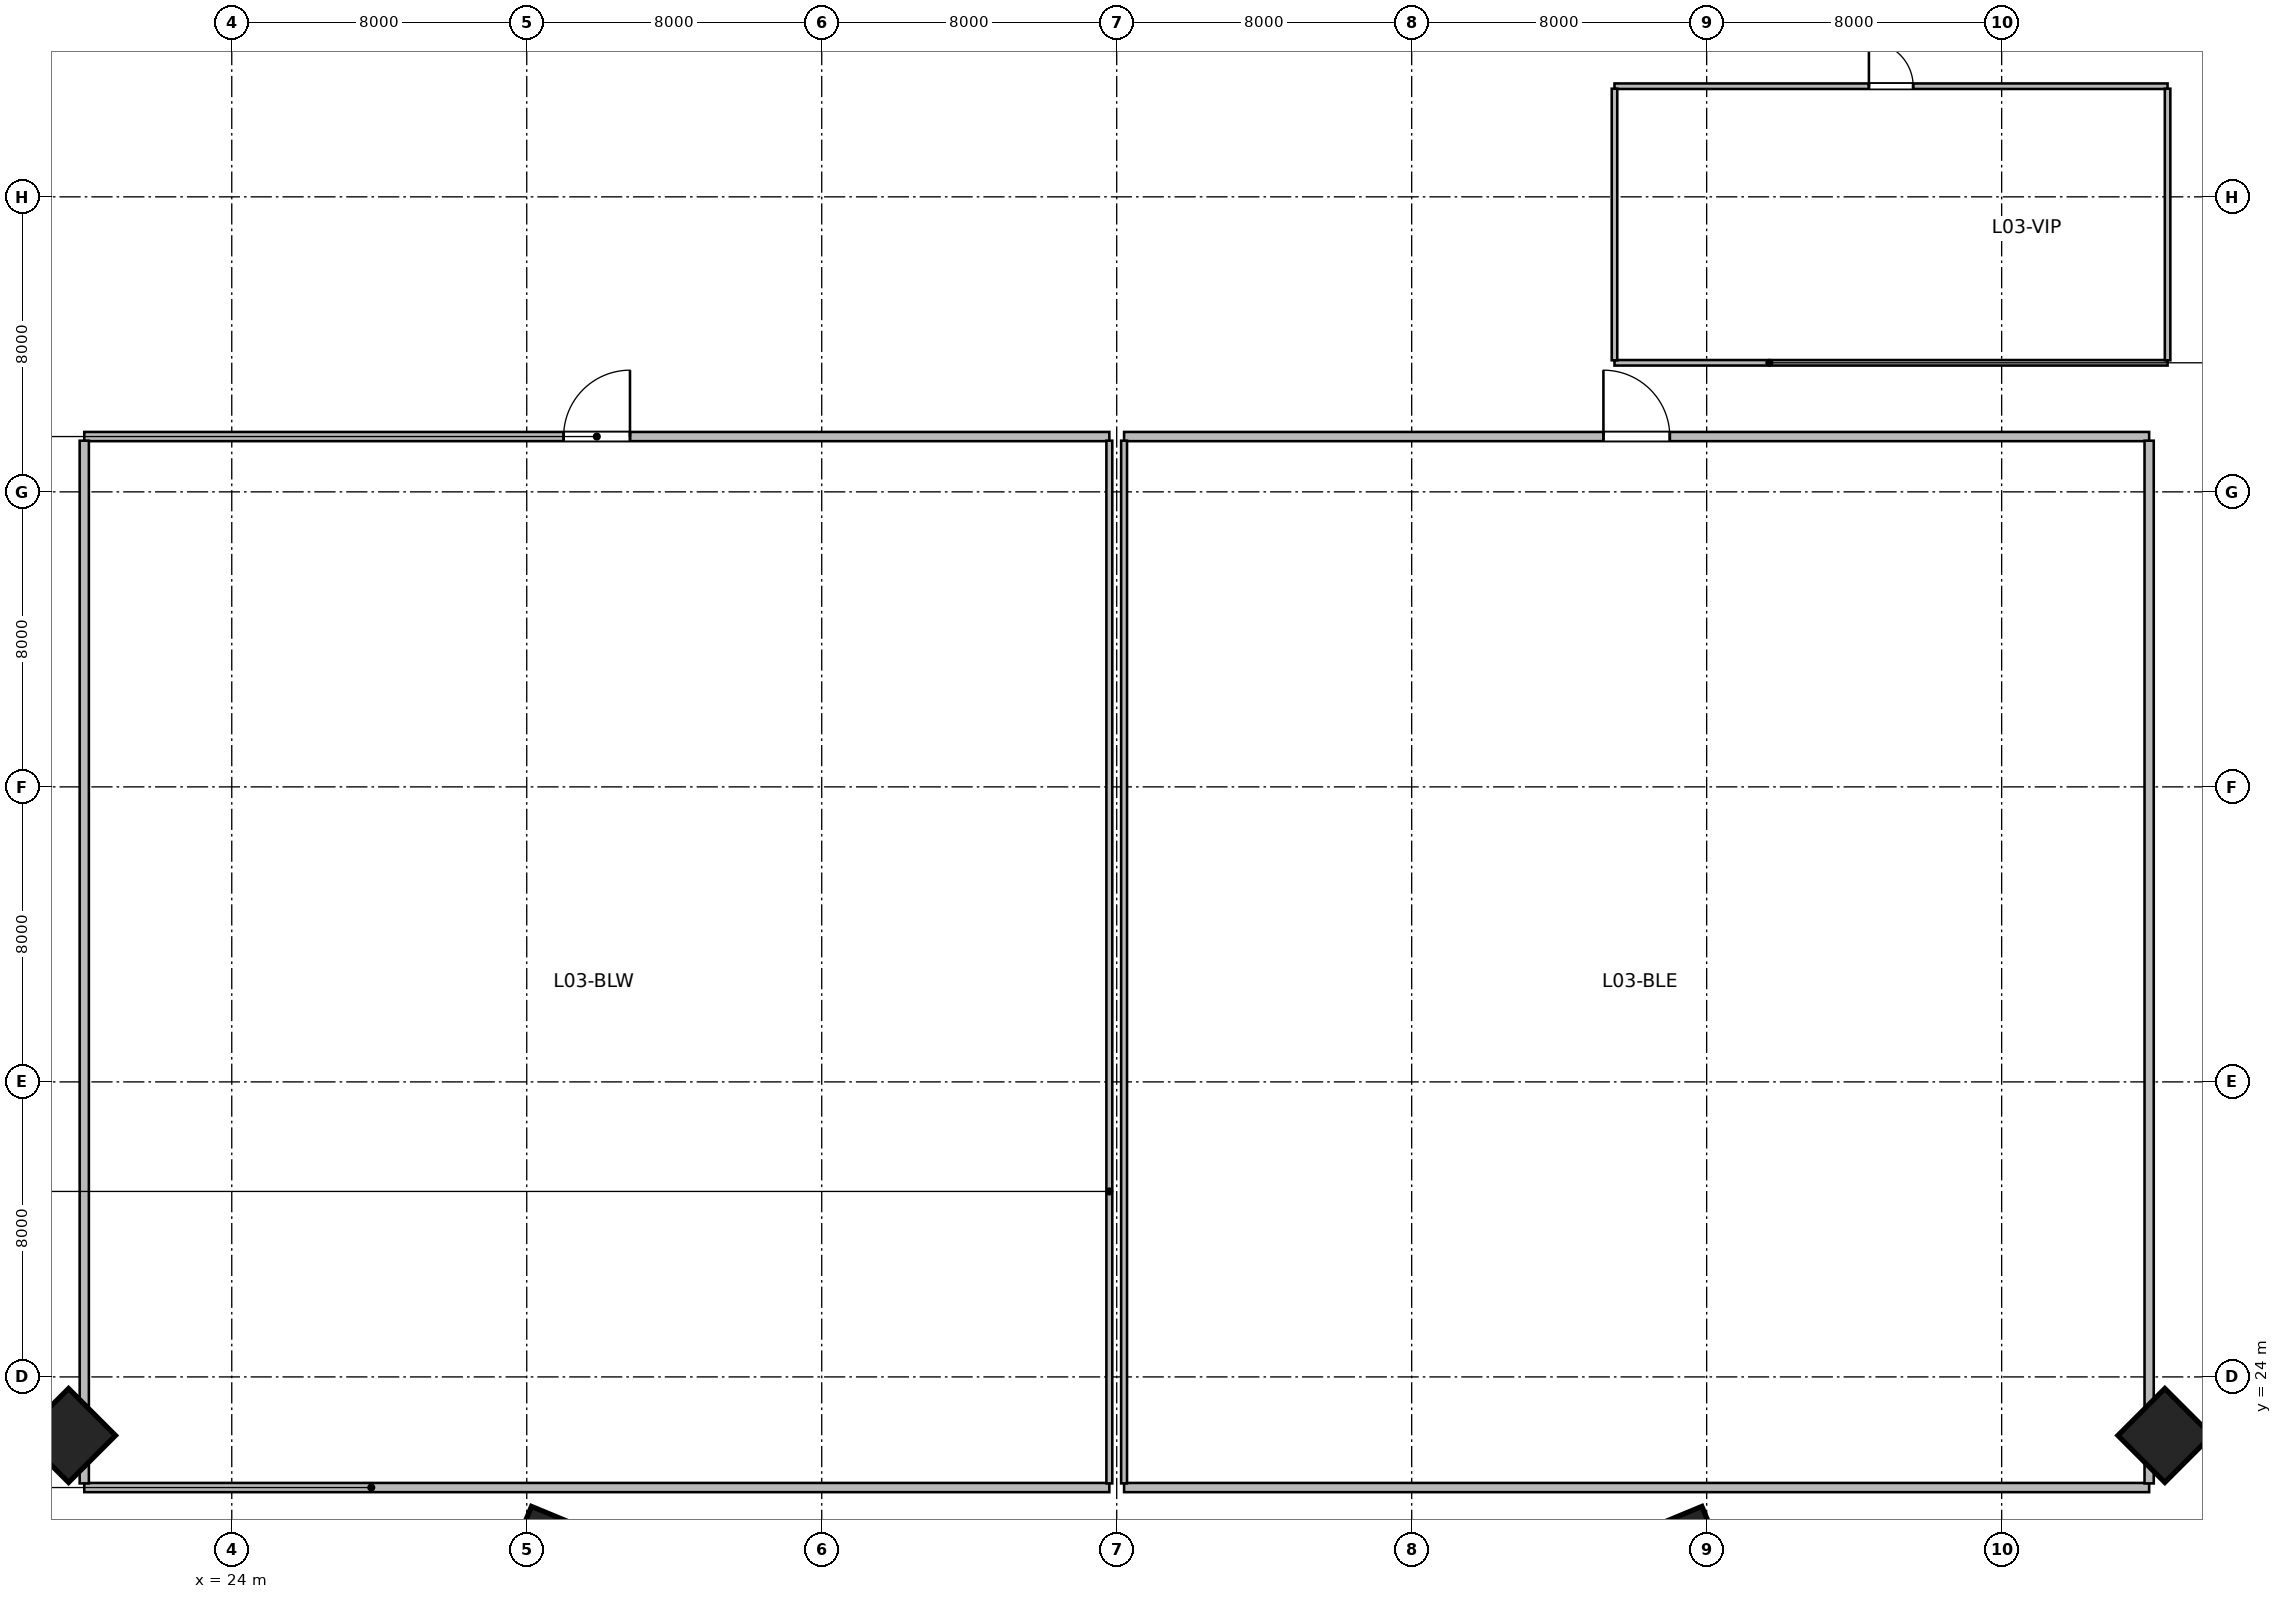
"""IFC4 building model, lengths in metres.
Left out: names, types, materials, properties, quantities, classifications, styles, units other than length and angle.
Written with IfcOpenShell. Run it as: python <this file> out.ifc"""

import sys

from ifc_helpers import new_model, si_unit, direction, frame, frame_2d, origin, origin_2d, place, context, subcontext, project, spatial, rectangle, extrude, source, transform, mapped, element, fill, save


model = new_model("IFC4")
c1 = context("Model", 3, precision=1e-05, world=origin(), true_north=direction((0.0, 1.0)))
c2 = subcontext(c1, "Body", "Model", "MODEL_VIEW")
j1 = project(units=[si_unit("LENGTHUNIT", "METRE"), si_unit("PLANEANGLEUNIT", "RADIAN")], contexts=[c1])
p1 = place(None, origin())
s1 = spatial("IfcSite", under=j1, at=p1, CompositionType="ELEMENT")
p2 = place(p1, origin())
s2 = spatial("IfcBuilding", under=s1, at=p2, CompositionType="ELEMENT")
p3 = place(p2, frame((0.0, 0.0, 18.0)))
s3 = spatial("IfcBuildingStorey", under=s2, at=p3, CompositionType="ELEMENT", Elevation=18.0)
m1 = source(origin(), c2, "Body", "SweptSolid", [
    extrude(rectangle(XDim=1.8, YDim=1.8, at=origin_2d()), origin(), (0.0, 0.0, 1.0), 6.0),
])
for number, where, z_axis, x_axis in (
    (1, (19.574, 22.412, 0.0), (0.0, 0.0, 1.0), (-0.707, -0.707, 0.0)),
    (2, (32.616, 19.312, 0.0), (0.0, 0.0, 1.0), (-0.383, -0.924, 0.0)),
    (3, (63.384, 19.312, 0.0), (0.0, 0.0, 1.0), (0.383, -0.924, 0.0)),
    (4, (76.426, 22.412, 0.0), (0.0, 0.0, 1.0), (0.707, -0.707, 0.0)),
):
    element("IfcColumn", number, at=place(p3, frame(where, z_axis=z_axis, x_axis=x_axis)), inside=s3, PredefinedType="COLUMN", context=c2, shape_type="MappedRepresentation", body=[
        mapped(m1, transform((0.0, 0.0, 0.0), scale=1.0)),
    ])
m2 = source(origin(), c2, "Body", "SweptSolid", [
    extrude(rectangle(XDim=27.8, YDim=0.25, at=frame_2d((13.9, 0.0))), origin(), (0.0, 0.0, 1.0), 4.681),
])
p4 = place(p3, frame((20.0, 21.0, 0.0), z_axis=(0.0, 0.0, 1.0), x_axis=(1.0, 0.0, 0.0)))
e5 = element("IfcWall", 5, at=p4, inside=s3, PredefinedType="PARTITIONING", context=c2, shape_type="MappedRepresentation", body=[
    mapped(m2, transform((0.0, 0.0, 0.0), scale=1.0)),
])
m3 = source(origin(), c2, "Body", "SweptSolid", [
    extrude(rectangle(XDim=27.8, YDim=0.25, at=frame_2d((13.9, 0.0))), origin(), (0.0, 0.0, 1.0), 5.62),
])
p5 = place(p3, frame((20.0, 49.5, 0.0), z_axis=(0.0, 0.0, 1.0), x_axis=(1.0, 0.0, 0.0)))
e6 = element("IfcWall", 6, at=p5, inside=s3, PredefinedType="PARTITIONING", context=c2, shape_type="MappedRepresentation", body=[
    mapped(m3, transform((0.0, 0.0, 0.0), scale=1.0)),
])
p6 = place(p5, frame((13.0, 0.0, 0.0)))
e7 = element("IfcOpeningElement", 7, at=p6, cuts=e6, PredefinedType="OPENING", context=c2, shape_type="SweptSolid", body=[
    extrude(rectangle(XDim=1.8, YDim=2.15, at=frame_2d((0.9, 1.075))), frame((0.0, 0.135, 0.0), z_axis=(0.0, -1.0, 0.0), x_axis=(1.0, 0.0, 0.0)), (0.0, 0.0, 1.0), 0.27),
])
m4 = source(origin(), c2, "Body", "SweptSolid", [
    extrude(rectangle(XDim=28.275, YDim=0.25, at=frame_2d((14.137, 0.0))), origin(), (0.0, 0.0, 1.0), 4.754),
])
p7 = place(p3, frame((20.0, 21.113, 0.0), z_axis=(0.0, 0.0, 1.0), x_axis=(0.0, 1.0, 0.0)))
e8 = element("IfcWall", 8, at=p7, inside=s3, PredefinedType="PARTITIONING", context=c2, shape_type="MappedRepresentation", body=[
    mapped(m4, transform((0.0, 0.0, 0.0), scale=1.0)),
])
m5 = source(origin(), c2, "Body", "SweptSolid", [
    extrude(rectangle(XDim=28.275, YDim=0.16, at=frame_2d((14.137, 0.0))), origin(), (0.0, 0.0, 1.0), 5.137),
])
p8 = place(p3, frame((47.8, 21.113, 0.0), z_axis=(0.0, 0.0, 1.0), x_axis=(0.0, 1.0, 0.0)))
e9 = element("IfcWall", 9, at=p8, inside=s3, PredefinedType="MOVABLE", context=c2, shape_type="MappedRepresentation", body=[
    mapped(m5, transform((0.0, 0.0, 0.0), scale=1.0)),
])
p9 = place(p3, frame((48.2, 21.0, 0.0), z_axis=(0.0, 0.0, 1.0), x_axis=(1.0, 0.0, 0.0)))
e10 = element("IfcWall", 10, at=p9, inside=s3, PredefinedType="PARTITIONING", context=c2, shape_type="MappedRepresentation", body=[
    mapped(m2, transform((0.0, 0.0, 0.0), scale=1.0)),
])
p10 = place(p3, frame((48.2, 49.5, 0.0), z_axis=(0.0, 0.0, 1.0), x_axis=(1.0, 0.0, 0.0)))
e11 = element("IfcWall", 11, at=p10, inside=s3, PredefinedType="PARTITIONING", context=c2, shape_type="MappedRepresentation", body=[
    mapped(m3, transform((0.0, 0.0, 0.0), scale=1.0)),
])
p11 = place(p10, frame((13.0, 0.0, 0.0)))
e12 = element("IfcOpeningElement", 12, at=p11, cuts=e11, PredefinedType="OPENING", context=c2, shape_type="SweptSolid", body=[
    extrude(rectangle(XDim=1.8, YDim=2.15, at=frame_2d((0.9, 1.075))), frame((0.0, 0.135, 0.0), z_axis=(0.0, -1.0, 0.0), x_axis=(1.0, 0.0, 0.0)), (0.0, 0.0, 1.0), 0.27),
])
p12 = place(p3, frame((48.2, 21.113, 0.0), z_axis=(0.0, 0.0, 1.0), x_axis=(0.0, 1.0, 0.0)))
e13 = element("IfcWall", 13, at=p12, inside=s3, PredefinedType="MOVABLE", context=c2, shape_type="MappedRepresentation", body=[
    mapped(m5, transform((0.0, 0.0, 0.0), scale=1.0)),
])
p13 = place(p3, frame((76.0, 21.113, 0.0), z_axis=(0.0, 0.0, 1.0), x_axis=(0.0, 1.0, 0.0)))
e14 = element("IfcWall", 14, at=p13, inside=s3, PredefinedType="PARTITIONING", context=c2, shape_type="MappedRepresentation", body=[
    mapped(m4, transform((0.0, 0.0, 0.0), scale=1.0)),
])
m6 = source(origin(), c2, "Body", "SweptSolid", [
    extrude(rectangle(XDim=15.0, YDim=0.15, at=frame_2d((7.5, 0.0))), origin(), (0.0, 0.0, 1.0), 5.62),
])
p14 = place(p3, frame((61.5, 51.5, 0.0), z_axis=(0.0, 0.0, 1.0), x_axis=(1.0, 0.0, 0.0)))
e15 = element("IfcWall", 15, at=p14, inside=s3, PredefinedType="PARTITIONING", context=c2, shape_type="MappedRepresentation", body=[
    mapped(m6, transform((0.0, 0.0, 0.0), scale=1.0)),
])
m7 = source(origin(), c2, "Body", "SweptSolid", [
    extrude(rectangle(XDim=15.0, YDim=0.15, at=frame_2d((7.5, 0.0))), origin(), (0.0, 0.0, 1.0), 4.754),
])
p15 = place(p3, frame((61.5, 59.0, 0.0), z_axis=(0.0, 0.0, 1.0), x_axis=(1.0, 0.0, 0.0)))
e16 = element("IfcWall", 16, at=p15, inside=s3, PredefinedType="PARTITIONING", context=c2, shape_type="MappedRepresentation", body=[
    mapped(m7, transform((0.0, 0.0, 0.0), scale=1.0)),
])
p16 = place(p15, frame((6.9, 0.0, 0.0)))
e17 = element("IfcOpeningElement", 17, at=p16, cuts=e16, PredefinedType="OPENING", context=c2, shape_type="SweptSolid", body=[
    extrude(rectangle(XDim=1.2, YDim=2.15, at=frame_2d((0.6, 1.075))), frame((0.0, 0.085, 0.0), z_axis=(0.0, -1.0, 0.0), x_axis=(1.0, 0.0, 0.0)), (0.0, 0.0, 1.0), 0.17),
])
m8 = source(origin(), c2, "Body", "SweptSolid", [
    extrude(rectangle(XDim=7.365, YDim=0.15, at=frame_2d((3.683, 0.0))), origin(), (0.0, 0.0, 1.0), 4.754),
])
p17 = place(p3, frame((61.5, 51.567, 0.0), z_axis=(0.0, 0.0, 1.0), x_axis=(0.0, 1.0, 0.0)))
e18 = element("IfcWall", 18, at=p17, inside=s3, PredefinedType="PARTITIONING", context=c2, shape_type="MappedRepresentation", body=[
    mapped(m8, transform((0.0, 0.0, 0.0), scale=1.0)),
])
m9 = source(origin(), c2, "Body", "SweptSolid", [
    extrude(rectangle(XDim=7.365, YDim=0.15, at=frame_2d((3.683, 0.0))), origin(), (0.0, 0.0, 1.0), 5.62),
])
p18 = place(p3, frame((76.5, 51.567, 0.0), z_axis=(0.0, 0.0, 1.0), x_axis=(0.0, 1.0, 0.0)))
e19 = element("IfcWall", 19, at=p18, inside=s3, PredefinedType="PARTITIONING", context=c2, shape_type="MappedRepresentation", body=[
    mapped(m9, transform((0.0, 0.0, 0.0), scale=1.0)),
])
m10 = source(origin(), c2, "Body", "SweptSolid", [
    extrude(rectangle(XDim=1.8, YDim=2.15, at=frame_2d((0.9, 1.075))), frame((0.0, 0.025, 0.0), z_axis=(0.0, -1.0, 0.0), x_axis=(1.0, 0.0, 0.0)), (0.0, 0.0, 1.0), 0.05),
])
p19 = place(p6, origin())
e20 = element("IfcDoor", 20, at=p19, inside=s3, OperationType="SINGLE_SWING_RIGHT", PredefinedType="DOOR", context=c2, shape_type="MappedRepresentation", body=[
    mapped(m10, transform((0.0, 0.0, 0.0), scale=1.0)),
])
fill(e7, e20)
p20 = place(p11, origin())
e21 = element("IfcDoor", 21, at=p20, inside=s3, OperationType="SINGLE_SWING_LEFT", PredefinedType="DOOR", context=c2, shape_type="MappedRepresentation", body=[
    mapped(m10, transform((0.0, 0.0, 0.0), scale=1.0)),
])
fill(e12, e21)
m11 = source(origin(), c2, "Body", "SweptSolid", [
    extrude(rectangle(XDim=1.2, YDim=2.15, at=frame_2d((0.6, 1.075))), frame((0.0, 0.025, 0.0), z_axis=(0.0, -1.0, 0.0), x_axis=(1.0, 0.0, 0.0)), (0.0, 0.0, 1.0), 0.05),
])
p21 = place(p16, origin())
e22 = element("IfcDoor", 22, at=p21, inside=s3, OperationType="SINGLE_SWING_LEFT", PredefinedType="DOOR", context=c2, shape_type="MappedRepresentation", body=[
    mapped(m11, transform((0.0, 0.0, 0.0), scale=1.0)),
])
fill(e17, e22)
save(model, sys.argv[1])
